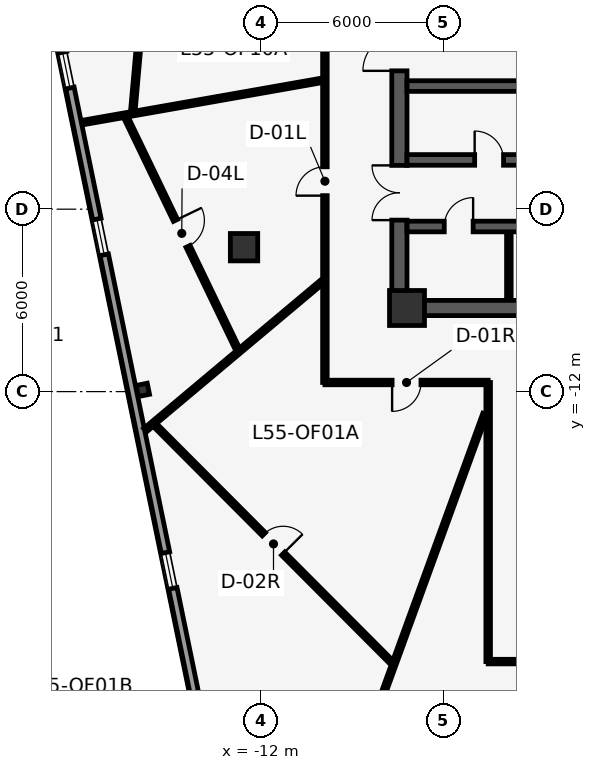
"""IFC4 building model, lengths in metres.
Left out: names, types, materials, properties, quantities, classifications, styles, units other than length and angle.
Written with IfcOpenShell. Run it as: python <this file> out.ifc"""

import sys

from ifc_helpers import new_model, si_unit, direction, frame, frame_2d, origin, origin_2d, place, context, subcontext, project, spatial, rectangle, i_section, extrude, element, fill, save


model = new_model("IFC4")
c1 = context("Model", 3, precision=1e-05, world=origin(), true_north=direction((0.0, 1.0)))
c2 = subcontext(c1, "Body", "Model", "MODEL_VIEW")
j1 = project(units=[si_unit("LENGTHUNIT", "METRE"), si_unit("PLANEANGLEUNIT", "RADIAN")], contexts=[c1])
p1 = place(None, origin())
s1 = spatial("IfcSite", under=j1, at=p1, CompositionType="ELEMENT")
p2 = place(p1, origin())
s2 = spatial("IfcBuilding", under=s1, at=p2, CompositionType="ELEMENT")
p3 = place(p2, frame((0.0, 0.0, 236.3)))
s3 = spatial("IfcBuildingStorey", under=s2, at=p3, CompositionType="ELEMENT", Elevation=236.3)
p4 = place(p3, frame((-7.45, -9.0, 0.0), z_axis=(0.0, 0.0, 1.0), x_axis=(0.0, 1.0, 0.0)))
e1 = element("IfcWall", 1, at=p4, inside=s3, PredefinedType="SHEAR", context=c2, shape_type="SweptSolid", body=[
    extrude(rectangle(XDim=9.1, YDim=0.5, at=frame_2d((4.55, 0.0))), origin(), (0.0, 0.0, 1.0), 3.85),
])
p5 = place(p4, frame((2.64, 0.0, 0.0)))
e2 = element("IfcOpeningElement", 2, at=p5, cuts=e1, PredefinedType="OPENING", context=c2, shape_type="SweptSolid", body=[
    extrude(rectangle(XDim=1.8, YDim=2.2, at=frame_2d((0.9, 1.1))), frame((0.0, 0.26, 0.0), z_axis=(0.0, -1.0, 0.0), x_axis=(1.0, 0.0, 0.0)), (0.0, 0.0, 1.0), 0.52),
])
p6 = place(p4, frame((7.55, 0.0, 0.0)))
e3 = element("IfcOpeningElement", 3, at=p6, cuts=e1, PredefinedType="OPENING", context=c2, shape_type="SweptSolid", body=[
    extrude(rectangle(XDim=1.2, YDim=2.15, at=frame_2d((0.6, 1.075))), frame((0.0, 0.26, 0.0), z_axis=(0.0, -1.0, 0.0), x_axis=(1.0, 0.0, 0.0)), (0.0, 0.0, 1.0), 0.52),
])
p7 = place(p3, frame((-7.45, -9.25, 0.0), z_axis=(0.0, 0.0, 1.0), x_axis=(1.0, 0.0, 0.0)))
e4 = element("IfcWall", 4, at=p7, inside=s3, PredefinedType="SHEAR", context=c2, shape_type="SweptSolid", body=[
    extrude(rectangle(XDim=14.9, YDim=0.5, at=frame_2d((7.45, 0.0))), origin(), (0.0, 0.0, 1.0), 3.85),
])
p8 = place(p3, frame((-7.2, -1.95, 0.0), z_axis=(0.0, 0.0, 1.0), x_axis=(1.0, 0.0, 0.0)))
e5 = element("IfcWall", 5, at=p8, inside=s3, PredefinedType="SHEAR", context=c2, shape_type="SweptSolid", body=[
    extrude(rectangle(XDim=14.4, YDim=0.35, at=frame_2d((7.2, 0.0))), origin(), (0.0, 0.0, 1.0), 3.85),
])
p9 = place(p3, frame((-7.2, -4.38, 0.0), z_axis=(0.0, 0.0, 1.0), x_axis=(1.0, 0.0, 0.0)))
e6 = element("IfcWall", 6, at=p9, inside=s3, PredefinedType="SHEAR", context=c2, shape_type="SweptSolid", body=[
    extrude(rectangle(XDim=14.4, YDim=0.35, at=frame_2d((7.2, 0.0))), origin(), (0.0, 0.0, 1.0), 3.85),
])
p10 = place(p9, frame((9.05, 0.0, 0.0)))
e7 = element("IfcOpeningElement", 7, at=p10, cuts=e6, PredefinedType="OPENING", context=c2, shape_type="SweptSolid", body=[
    extrude(rectangle(XDim=1.1, YDim=2.2, at=frame_2d((0.55, 1.1))), frame((0.0, 0.185, 0.0), z_axis=(0.0, -1.0, 0.0), x_axis=(1.0, 0.0, 0.0)), (0.0, 0.0, 1.0), 0.37),
])
p11 = place(p9, frame((10.75, 0.0, 0.0)))
e8 = element("IfcOpeningElement", 8, at=p11, cuts=e6, PredefinedType="OPENING", context=c2, shape_type="SweptSolid", body=[
    extrude(rectangle(XDim=1.1, YDim=2.2, at=frame_2d((0.55, 1.1))), frame((0.0, 0.185, 0.0), z_axis=(0.0, -1.0, 0.0), x_axis=(1.0, 0.0, 0.0)), (0.0, 0.0, 1.0), 0.37),
])
p12 = place(p9, frame((12.8, 0.0, 0.0)))
e9 = element("IfcOpeningElement", 9, at=p12, cuts=e6, PredefinedType="OPENING", context=c2, shape_type="SweptSolid", body=[
    extrude(rectangle(XDim=1.1, YDim=2.2, at=frame_2d((0.55, 1.1))), frame((0.0, 0.185, 0.0), z_axis=(0.0, -1.0, 0.0), x_axis=(1.0, 0.0, 0.0)), (0.0, 0.0, 1.0), 0.37),
])
p13 = place(p9, frame((2.225, 0.0, 0.0)))
e10 = element("IfcOpeningElement", 10, at=p13, cuts=e6, PredefinedType="OPENING", context=c2, shape_type="SweptSolid", body=[
    extrude(rectangle(XDim=0.95, YDim=2.15, at=frame_2d((0.475, 1.075))), frame((0.0, 0.185, 0.0), z_axis=(0.0, -1.0, 0.0), x_axis=(1.0, 0.0, 0.0)), (0.0, 0.0, 1.0), 0.37),
])
p14 = place(p9, frame((6.375, 0.0, 0.0)))
e11 = element("IfcOpeningElement", 11, at=p14, cuts=e6, PredefinedType="OPENING", context=c2, shape_type="SweptSolid", body=[
    extrude(rectangle(XDim=0.95, YDim=2.15, at=frame_2d((0.475, 1.075))), frame((0.0, 0.185, 0.0), z_axis=(0.0, -1.0, 0.0), x_axis=(1.0, 0.0, 0.0)), (0.0, 0.0, 1.0), 0.37),
])
p15 = place(p3, frame((-7.2, -6.57, 0.0), z_axis=(0.0, 0.0, 1.0), x_axis=(1.0, 0.0, 0.0)))
e12 = element("IfcWall", 12, at=p15, inside=s3, PredefinedType="SHEAR", context=c2, shape_type="SweptSolid", body=[
    extrude(rectangle(XDim=14.4, YDim=0.35, at=frame_2d((7.2, 0.0))), origin(), (0.0, 0.0, 1.0), 3.85),
])
p16 = place(p15, frame((1.225, 0.0, 0.0)))
e13 = element("IfcOpeningElement", 13, at=p16, cuts=e12, PredefinedType="OPENING", context=c2, shape_type="SweptSolid", body=[
    extrude(rectangle(XDim=0.95, YDim=2.15, at=frame_2d((0.475, 1.075))), frame((0.0, 0.185, 0.0), z_axis=(0.0, -1.0, 0.0), x_axis=(1.0, 0.0, 0.0)), (0.0, 0.0, 1.0), 0.37),
])
p17 = place(p15, frame((5.275, 0.0, 0.0)))
e14 = element("IfcOpeningElement", 14, at=p17, cuts=e12, PredefinedType="OPENING", context=c2, shape_type="SweptSolid", body=[
    extrude(rectangle(XDim=0.95, YDim=2.15, at=frame_2d((0.475, 1.075))), frame((0.0, 0.185, 0.0), z_axis=(0.0, -1.0, 0.0), x_axis=(1.0, 0.0, 0.0)), (0.0, 0.0, 1.0), 0.37),
])
p18 = place(p15, frame((12.91, 0.0, 0.0)))
e15 = element("IfcOpeningElement", 15, at=p18, cuts=e12, PredefinedType="OPENING", context=c2, shape_type="SweptSolid", body=[
    extrude(rectangle(XDim=0.88, YDim=2.15, at=frame_2d((0.44, 1.075))), frame((0.0, 0.185, 0.0), z_axis=(0.0, -1.0, 0.0), x_axis=(1.0, 0.0, 0.0)), (0.0, 0.0, 1.0), 0.37),
])
p19 = place(p3, frame((-7.2, -9.25, 0.0), z_axis=(0.0, 0.0, 1.0), x_axis=(1.0, 0.0, 0.0)))
e16 = element("IfcColumn", 16, at=p19, inside=s3, PredefinedType="COLUMN", context=c2, shape_type="SweptSolid", body=[
    extrude(rectangle(XDim=1.15, YDim=1.15, at=origin_2d()), origin(), (0.0, 0.0, 1.0), 4.1),
])
p20 = place(p3, frame((-12.56, -7.25, 0.0), z_axis=(0.0, 0.0, 1.0), x_axis=(1.0, 0.0, 0.0)))
e17 = element("IfcColumn", 17, at=p20, inside=s3, PredefinedType="COLUMN", context=c2, shape_type="SweptSolid", body=[
    extrude(rectangle(XDim=0.9, YDim=0.9, at=origin_2d()), origin(), (0.0, 0.0, 1.0), 4.1),
])
p21 = place(p3, frame((-15.889, -11.944, 0.0), z_axis=(0.0, 0.0, 1.0), x_axis=(-0.201248886216, 0.979540139962, 0.0)))
e18 = element("IfcColumn", 18, at=p21, inside=s3, PredefinedType="COLUMN", context=c2, shape_type="SweptSolid", body=[
    extrude(i_section(OverallWidth=0.373, OverallDepth=0.373, WebThickness=0.016, FlangeThickness=0.026, at=origin_2d()), origin(), (0.0, 0.0, 1.0), 4.1),
])
p22 = place(p3, frame((30.935, 2.916, 0.0), z_axis=(0.0, 0.0, 1.0), x_axis=(-0.743143233829, -0.66913237406, 0.0)))
e19 = element("IfcWall", 19, at=p22, inside=s3, PredefinedType="STANDARD", context=c2, shape_type="SweptSolid", body=[
    extrude(rectangle(XDim=49.88, YDim=0.28, at=frame_2d((24.94, 0.0))), origin(), (0.0, 0.0, 1.0), 3.85),
])
p23 = place(p22, frame((24.44, 0.0, 0.0)))
e20 = element("IfcOpeningElement", 20, at=p23, cuts=e19, PredefinedType="OPENING", context=c2, shape_type="SweptSolid", body=[
    extrude(rectangle(XDim=1.0, YDim=2.15, at=frame_2d((0.5, 1.075))), frame((0.0, 0.15, 0.0), z_axis=(0.0, -1.0, 0.0), x_axis=(1.0, 0.0, 0.0)), (0.0, 0.0, 1.0), 0.3),
])
p24 = place(p22, frame((4.74, 0.0, 0.85)))
e21 = element("IfcOpeningElement", 21, at=p24, cuts=e19, PredefinedType="OPENING", context=c2, shape_type="SweptSolid", body=[
    extrude(rectangle(XDim=1.2, YDim=2.2, at=frame_2d((0.6, 1.1))), frame((0.0, 0.15, 0.0), z_axis=(0.0, -1.0, 0.0), x_axis=(1.0, 0.0, 0.0)), (0.0, 0.0, 1.0), 0.3),
])
p25 = place(p22, frame((10.34, 0.0, 0.85)))
e22 = element("IfcOpeningElement", 22, at=p25, cuts=e19, PredefinedType="OPENING", context=c2, shape_type="SweptSolid", body=[
    extrude(rectangle(XDim=1.2, YDim=2.2, at=frame_2d((0.6, 1.1))), frame((0.0, 0.15, 0.0), z_axis=(0.0, -1.0, 0.0), x_axis=(1.0, 0.0, 0.0)), (0.0, 0.0, 1.0), 0.3),
])
p26 = place(p22, frame((27.14, 0.0, 0.85)))
e23 = element("IfcOpeningElement", 23, at=p26, cuts=e19, PredefinedType="OPENING", context=c2, shape_type="SweptSolid", body=[
    extrude(rectangle(XDim=1.2, YDim=2.2, at=frame_2d((0.6, 1.1))), frame((0.0, 0.15, 0.0), z_axis=(0.0, -1.0, 0.0), x_axis=(1.0, 0.0, 0.0)), (0.0, 0.0, 1.0), 0.3),
])
p27 = place(p22, frame((38.34, 0.0, 0.85)))
e24 = element("IfcOpeningElement", 24, at=p27, cuts=e19, PredefinedType="OPENING", context=c2, shape_type="SweptSolid", body=[
    extrude(rectangle(XDim=1.2, YDim=2.2, at=frame_2d((0.6, 1.1))), frame((0.0, 0.15, 0.0), z_axis=(0.0, -1.0, 0.0), x_axis=(1.0, 0.0, 0.0)), (0.0, 0.0, 1.0), 0.3),
])
p28 = place(p22, frame((43.94, 0.0, 0.85)))
e25 = element("IfcOpeningElement", 25, at=p28, cuts=e19, PredefinedType="OPENING", context=c2, shape_type="SweptSolid", body=[
    extrude(rectangle(XDim=1.2, YDim=2.2, at=frame_2d((0.6, 1.1))), frame((0.0, 0.15, 0.0), z_axis=(0.0, -1.0, 0.0), x_axis=(1.0, 0.0, 0.0)), (0.0, 0.0, 1.0), 0.3),
])
p29 = place(p3, frame((-12.893, -28.239, 0.0), z_axis=(0.0, 0.0, 1.0), x_axis=(-0.201426823496, 0.979503565474, 0.0)))
e26 = element("IfcWall", 26, at=p29, inside=s3, PredefinedType="STANDARD", context=c2, shape_type="SweptSolid", body=[
    extrude(rectangle(XDim=49.145, YDim=0.28, at=frame_2d((24.573, 0.0))), origin(), (0.0, 0.0, 1.0), 3.85),
])
p30 = place(p29, frame((4.373, 0.0, 0.85)))
e27 = element("IfcOpeningElement", 27, at=p30, cuts=e26, PredefinedType="OPENING", context=c2, shape_type="SweptSolid", body=[
    extrude(rectangle(XDim=1.2, YDim=2.2, at=frame_2d((0.6, 1.1))), frame((0.0, 0.15, 0.0), z_axis=(0.0, -1.0, 0.0), x_axis=(1.0, 0.0, 0.0)), (0.0, 0.0, 1.0), 0.3),
])
p31 = place(p29, frame((9.973, 0.0, 0.85)))
e28 = element("IfcOpeningElement", 28, at=p31, cuts=e26, PredefinedType="OPENING", context=c2, shape_type="SweptSolid", body=[
    extrude(rectangle(XDim=1.2, YDim=2.2, at=frame_2d((0.6, 1.1))), frame((0.0, 0.15, 0.0), z_axis=(0.0, -1.0, 0.0), x_axis=(1.0, 0.0, 0.0)), (0.0, 0.0, 1.0), 0.3),
])
p32 = place(p29, frame((21.173, 0.0, 0.85)))
e29 = element("IfcOpeningElement", 29, at=p32, cuts=e26, PredefinedType="OPENING", context=c2, shape_type="SweptSolid", body=[
    extrude(rectangle(XDim=1.2, YDim=2.2, at=frame_2d((0.6, 1.1))), frame((0.0, 0.15, 0.0), z_axis=(0.0, -1.0, 0.0), x_axis=(1.0, 0.0, 0.0)), (0.0, 0.0, 1.0), 0.3),
])
p33 = place(p29, frame((26.773, 0.0, 0.85)))
e30 = element("IfcOpeningElement", 30, at=p33, cuts=e26, PredefinedType="OPENING", context=c2, shape_type="SweptSolid", body=[
    extrude(rectangle(XDim=1.2, YDim=2.2, at=frame_2d((0.6, 1.1))), frame((0.0, 0.15, 0.0), z_axis=(0.0, -1.0, 0.0), x_axis=(1.0, 0.0, 0.0)), (0.0, 0.0, 1.0), 0.3),
])
p34 = place(p29, frame((37.973, 0.0, 0.85)))
e31 = element("IfcOpeningElement", 31, at=p34, cuts=e26, PredefinedType="OPENING", context=c2, shape_type="SweptSolid", body=[
    extrude(rectangle(XDim=1.2, YDim=2.2, at=frame_2d((0.6, 1.1))), frame((0.0, 0.15, 0.0), z_axis=(0.0, -1.0, 0.0), x_axis=(1.0, 0.0, 0.0)), (0.0, 0.0, 1.0), 0.3),
])
p35 = place(p29, frame((43.573, 0.0, 0.85)))
e32 = element("IfcOpeningElement", 32, at=p35, cuts=e26, PredefinedType="OPENING", context=c2, shape_type="SweptSolid", body=[
    extrude(rectangle(XDim=1.2, YDim=2.2, at=frame_2d((0.6, 1.1))), frame((0.0, 0.15, 0.0), z_axis=(0.0, -1.0, 0.0), x_axis=(1.0, 0.0, 0.0)), (0.0, 0.0, 1.0), 0.3),
])
p36 = place(p3, frame((-3.85, -8.85, 0.0), z_axis=(0.0, 0.0, 1.0), x_axis=(0.0, 1.0, 0.0)))
e33 = element("IfcWall", 33, at=p36, inside=s3, PredefinedType="PARTITIONING", context=c2, shape_type="SweptSolid", body=[
    extrude(rectangle(XDim=2.08, YDim=0.15, at=frame_2d((1.04, 0.0))), origin(), (0.0, 0.0, 1.0), 3.85),
])
p37 = place(p3, frame((-4.53, -11.7, 0.0), z_axis=(0.0, 0.0, 1.0), x_axis=(-1.0, 0.0, 0.0)))
e34 = element("IfcWall", 34, at=p37, inside=s3, PredefinedType="PARTITIONING", context=c2, shape_type="SweptSolid", body=[
    extrude(rectangle(XDim=5.37, YDim=0.15, at=frame_2d((2.685, 0.0))), origin(), (0.0, 0.0, 1.0), 3.85),
])
p38 = place(p37, frame((2.21, 0.0, 0.0)))
e35 = element("IfcOpeningElement", 35, at=p38, cuts=e34, PredefinedType="OPENING", context=c2, shape_type="SweptSolid", body=[
    extrude(rectangle(XDim=0.95, YDim=2.15, at=frame_2d((0.475, 1.075))), frame((0.0, 0.085, 0.0), z_axis=(0.0, -1.0, 0.0), x_axis=(1.0, 0.0, 0.0)), (0.0, 0.0, 1.0), 0.17),
])
p39 = place(p3, frame((-9.9, -11.7, 0.0), z_axis=(0.0, 0.0, 1.0), x_axis=(0.0, 1.0, 0.0)))
e36 = element("IfcWall", 36, at=p39, inside=s3, PredefinedType="PARTITIONING", context=c2, shape_type="SweptSolid", body=[
    extrude(rectangle(XDim=23.55, YDim=0.15, at=frame_2d((11.775, 0.0))), origin(), (0.0, 0.0, 1.0), 3.85),
])
p40 = place(p39, frame((6.145, 0.0, 0.0)))
e37 = element("IfcOpeningElement", 37, at=p40, cuts=e36, PredefinedType="OPENING", context=c2, shape_type="SweptSolid", body=[
    extrude(rectangle(XDim=0.95, YDim=2.15, at=frame_2d((0.475, 1.075))), frame((0.0, 0.085, 0.0), z_axis=(0.0, -1.0, 0.0), x_axis=(1.0, 0.0, 0.0)), (0.0, 0.0, 1.0), 0.17),
])
p41 = place(p39, frame((18.645, 0.0, 0.0)))
e38 = element("IfcOpeningElement", 38, at=p41, cuts=e36, PredefinedType="OPENING", context=c2, shape_type="SweptSolid", body=[
    extrude(rectangle(XDim=0.95, YDim=2.15, at=frame_2d((0.475, 1.075))), frame((0.0, 0.085, 0.0), z_axis=(0.0, -1.0, 0.0), x_axis=(1.0, 0.0, 0.0)), (0.0, 0.0, 1.0), 0.17),
])
p42 = place(p39, frame((11.967, 0.0, 0.0)))
e39 = element("IfcOpeningElement", 39, at=p42, cuts=e36, PredefinedType="OPENING", context=c2, shape_type="SweptSolid", body=[
    extrude(rectangle(XDim=0.95, YDim=2.15, at=frame_2d((0.475, 1.075))), frame((0.0, 0.085, 0.0), z_axis=(0.0, -1.0, 0.0), x_axis=(1.0, 0.0, 0.0)), (0.0, 0.0, 1.0), 0.17),
])
p43 = place(p3, frame((-2.22, -20.88, 0.0), z_axis=(0.0, 0.0, 1.0), x_axis=(-1.0, 0.0, 0.0)))
e40 = element("IfcWall", 40, at=p43, inside=s3, PredefinedType="PARTITIONING", context=c2, shape_type="SweptSolid", body=[
    extrude(rectangle(XDim=2.31, YDim=0.15, at=frame_2d((1.155, 0.0))), origin(), (0.0, 0.0, 1.0), 3.85),
])
p44 = place(p3, frame((-4.53, -20.88, 0.0), z_axis=(0.0, 0.0, 1.0), x_axis=(0.0, 1.0, 0.0)))
e41 = element("IfcWall", 41, at=p44, inside=s3, PredefinedType="PARTITIONING", context=c2, shape_type="SweptSolid", body=[
    extrude(rectangle(XDim=9.18, YDim=0.15, at=frame_2d((4.59, 0.0))), origin(), (0.0, 0.0, 1.0), 3.85),
])
p45 = place(p3, frame((-10.005, -1.764, 0.0), z_axis=(0.0, 0.0, 1.0), x_axis=(-0.984809322237, -0.173639277917, 0.0)))
e42 = element("IfcWall", 42, at=p45, inside=s3, PredefinedType="PARTITIONING", context=c2, shape_type="SweptSolid", body=[
    extrude(rectangle(XDim=8.01, YDim=0.15, at=frame_2d((4.005, 0.0))), origin(), (0.0, 0.0, 1.0), 3.85),
])
p46 = place(p3, frame((-10.005, -8.395, 0.0), z_axis=(0.0, 0.0, 1.0), x_axis=(-0.766058052835, -0.64277138991, 0.0)))
e43 = element("IfcWall", 43, at=p46, inside=s3, PredefinedType="PARTITIONING", context=c2, shape_type="SweptSolid", body=[
    extrude(rectangle(XDim=7.583, YDim=0.15, at=frame_2d((3.791, 0.0))), origin(), (0.0, 0.0, 1.0), 3.85),
])
p47 = place(p3, frame((-4.635, -12.735, 0.0), z_axis=(0.0, 0.0, 1.0), x_axis=(-0.342021497246, -0.939692127998, 0.0)))
e44 = element("IfcWall", 44, at=p47, inside=s3, PredefinedType="PARTITIONING", context=c2, shape_type="SweptSolid", body=[
    extrude(rectangle(XDim=15.699, YDim=0.15, at=frame_2d((7.85, 0.0))), origin(), (0.0, 0.0, 1.0), 3.85),
])
p48 = place(p3, frame((-16.471, -2.93, 0.0), z_axis=(0.0, 0.0, 1.0), x_axis=(0.434035401787, -0.900895815283, 0.0)))
e45 = element("IfcWall", 45, at=p48, inside=s3, PredefinedType="PARTITIONING", context=c2, shape_type="SweptSolid", body=[
    extrude(rectangle(XDim=8.583, YDim=0.15, at=frame_2d((4.292, 0.0))), origin(), (0.0, 0.0, 1.0), 3.85),
])
p49 = place(p48, frame((3.816, 0.0, 0.0)))
e46 = element("IfcOpeningElement", 46, at=p49, cuts=e45, PredefinedType="OPENING", context=c2, shape_type="SweptSolid", body=[
    extrude(rectangle(XDim=0.95, YDim=2.15, at=frame_2d((0.475, 1.075))), frame((0.0, 0.085, 0.0), z_axis=(0.0, -1.0, 0.0), x_axis=(1.0, 0.0, 0.0)), (0.0, 0.0, 1.0), 0.17),
])
p50 = place(p3, frame((-15.528, -13.062, 0.0), z_axis=(0.0, 0.0, 1.0), x_axis=(0.706087904812, -0.708124191564, 0.0)))
e47 = element("IfcWall", 47, at=p50, inside=s3, PredefinedType="PARTITIONING", context=c2, shape_type="SweptSolid", body=[
    extrude(rectangle(XDim=11.15, YDim=0.15, at=frame_2d((5.575, 0.0))), origin(), (0.0, 0.0, 1.0), 3.85),
])
p51 = place(p50, frame((5.125, 0.0, 0.0)))
e48 = element("IfcOpeningElement", 48, at=p51, cuts=e47, PredefinedType="OPENING", context=c2, shape_type="SweptSolid", body=[
    extrude(rectangle(XDim=0.9, YDim=2.1, at=frame_2d((0.45, 1.05))), frame((0.0, 0.085, 0.0), z_axis=(0.0, -1.0, 0.0), x_axis=(1.0, 0.0, 0.0)), (0.0, 0.0, 1.0), 0.17),
])
p52 = place(p3, frame((-15.524, 5.018, 0.0), z_axis=(0.0, 0.0, 1.0), x_axis=(-0.088751444217, -0.996053804345, 0.0)))
e49 = element("IfcWall", 49, at=p52, inside=s3, PredefinedType="PARTITIONING", context=c2, shape_type="SweptSolid", body=[
    extrude(rectangle(XDim=7.884, YDim=0.15, at=frame_2d((3.942, 0.0))), origin(), (0.0, 0.0, 1.0), 3.415),
])
p53 = place(p52, frame((3.492, 0.0, 0.0)))
e50 = element("IfcOpeningElement", 50, at=p53, cuts=e49, PredefinedType="OPENING", context=c2, shape_type="SweptSolid", body=[
    extrude(rectangle(XDim=0.9, YDim=2.1, at=frame_2d((0.45, 1.05))), frame((0.0, 0.085, 0.0), z_axis=(0.0, -1.0, 0.0), x_axis=(1.0, 0.0, 0.0)), (0.0, 0.0, 1.0), 0.17),
])
p54 = place(p31, origin())
e51 = element("IfcWindow", 51, at=p54, inside=s3, PartitioningType="SINGLE_PANEL", PredefinedType="WINDOW", context=c2, shape_type="SweptSolid", body=[
    extrude(rectangle(XDim=1.2, YDim=2.2, at=frame_2d((0.6, 1.1))), frame((0.0, 0.03, 0.0), z_axis=(0.0, -1.0, 0.0), x_axis=(1.0, 0.0, 0.0)), (0.0, 0.0, 1.0), 0.06),
])
fill(e28, e51)
p55 = place(p32, origin())
e52 = element("IfcWindow", 52, at=p55, inside=s3, PartitioningType="SINGLE_PANEL", PredefinedType="WINDOW", context=c2, shape_type="SweptSolid", body=[
    extrude(rectangle(XDim=1.2, YDim=2.2, at=frame_2d((0.6, 1.1))), frame((0.0, 0.03, 0.0), z_axis=(0.0, -1.0, 0.0), x_axis=(1.0, 0.0, 0.0)), (0.0, 0.0, 1.0), 0.06),
])
fill(e29, e52)
p56 = place(p33, origin())
e53 = element("IfcWindow", 53, at=p56, inside=s3, PartitioningType="SINGLE_PANEL", PredefinedType="WINDOW", context=c2, shape_type="SweptSolid", body=[
    extrude(rectangle(XDim=1.2, YDim=2.2, at=frame_2d((0.6, 1.1))), frame((0.0, 0.03, 0.0), z_axis=(0.0, -1.0, 0.0), x_axis=(1.0, 0.0, 0.0)), (0.0, 0.0, 1.0), 0.06),
])
fill(e30, e53)
p57 = place(p5, origin())
e54 = element("IfcDoor", 54, at=p57, inside=s3, OperationType="DOUBLE_DOOR_SINGLE_SWING", PredefinedType="DOOR", context=c2, shape_type="SweptSolid", body=[
    extrude(rectangle(XDim=1.8, YDim=2.2, at=frame_2d((0.9, 1.1))), frame((0.0, 0.025, 0.0), z_axis=(0.0, -1.0, 0.0), x_axis=(1.0, 0.0, 0.0)), (0.0, 0.0, 1.0), 0.05),
])
fill(e2, e54)
p58 = place(p6, origin())
e55 = element("IfcDoor", 55, at=p58, inside=s3, OperationType="SINGLE_SWING_LEFT", PredefinedType="DOOR", context=c2, shape_type="SweptSolid", body=[
    extrude(rectangle(XDim=1.2, YDim=2.15, at=frame_2d((0.6, 1.075))), frame((0.0, 0.025, 0.0), z_axis=(0.0, -1.0, 0.0), x_axis=(1.0, 0.0, 0.0)), (0.0, 0.0, 1.0), 0.05),
])
fill(e3, e55)
p59 = place(p13, origin())
e56 = element("IfcDoor", 56, at=p59, inside=s3, OperationType="SINGLE_SWING_LEFT", PredefinedType="DOOR", context=c2, shape_type="SweptSolid", body=[
    extrude(rectangle(XDim=0.95, YDim=2.15, at=frame_2d((0.475, 1.075))), frame((0.0, 0.025, 0.0), z_axis=(0.0, -1.0, 0.0), x_axis=(1.0, 0.0, 0.0)), (0.0, 0.0, 1.0), 0.05),
])
fill(e10, e56)
p60 = place(p16, origin())
e57 = element("IfcDoor", 57, at=p60, inside=s3, OperationType="SINGLE_SWING_RIGHT", PredefinedType="DOOR", context=c2, shape_type="SweptSolid", body=[
    extrude(rectangle(XDim=0.95, YDim=2.15, at=frame_2d((0.475, 1.075))), frame((0.0, 0.025, 0.0), z_axis=(0.0, -1.0, 0.0), x_axis=(1.0, 0.0, 0.0)), (0.0, 0.0, 1.0), 0.05),
])
fill(e13, e57)
p61 = place(p49, origin())
e58 = element("IfcDoor", 58, at=p61, inside=s3, OperationType="SINGLE_SWING_LEFT", PredefinedType="DOOR", context=c2, shape_type="SweptSolid", body=[
    extrude(rectangle(XDim=0.95, YDim=2.15, at=frame_2d((0.475, 1.075))), frame((0.0, 0.025, 0.0), z_axis=(0.0, -1.0, 0.0), x_axis=(1.0, 0.0, 0.0)), (0.0, 0.0, 1.0), 0.05),
])
fill(e46, e58)
p62 = place(p51, origin())
e59 = element("IfcDoor", 59, at=p62, inside=s3, OperationType="SINGLE_SWING_RIGHT", PredefinedType="DOOR", context=c2, shape_type="SweptSolid", body=[
    extrude(rectangle(XDim=0.9, YDim=2.1, at=frame_2d((0.45, 1.05))), frame((0.0, 0.025, 0.0), z_axis=(0.0, -1.0, 0.0), x_axis=(1.0, 0.0, 0.0)), (0.0, 0.0, 1.0), 0.05),
])
fill(e48, e59)
p63 = place(p40, origin())
e60 = element("IfcDoor", 60, at=p63, inside=s3, OperationType="SINGLE_SWING_LEFT", PredefinedType="DOOR", context=c2, shape_type="SweptSolid", body=[
    extrude(rectangle(XDim=0.95, YDim=2.15, at=frame_2d((0.475, 1.075))), frame((0.0, 0.025, 0.0), z_axis=(0.0, -1.0, 0.0), x_axis=(1.0, 0.0, 0.0)), (0.0, 0.0, 1.0), 0.05),
])
fill(e37, e60)
p64 = place(p38, origin())
e61 = element("IfcDoor", 61, at=p64, inside=s3, OperationType="SINGLE_SWING_RIGHT", PredefinedType="DOOR", context=c2, shape_type="SweptSolid", body=[
    extrude(rectangle(XDim=0.95, YDim=2.15, at=frame_2d((0.475, 1.075))), frame((0.0, 0.025, 0.0), z_axis=(0.0, -1.0, 0.0), x_axis=(1.0, 0.0, 0.0)), (0.0, 0.0, 1.0), 0.05),
])
fill(e35, e61)
save(model, sys.argv[1])
